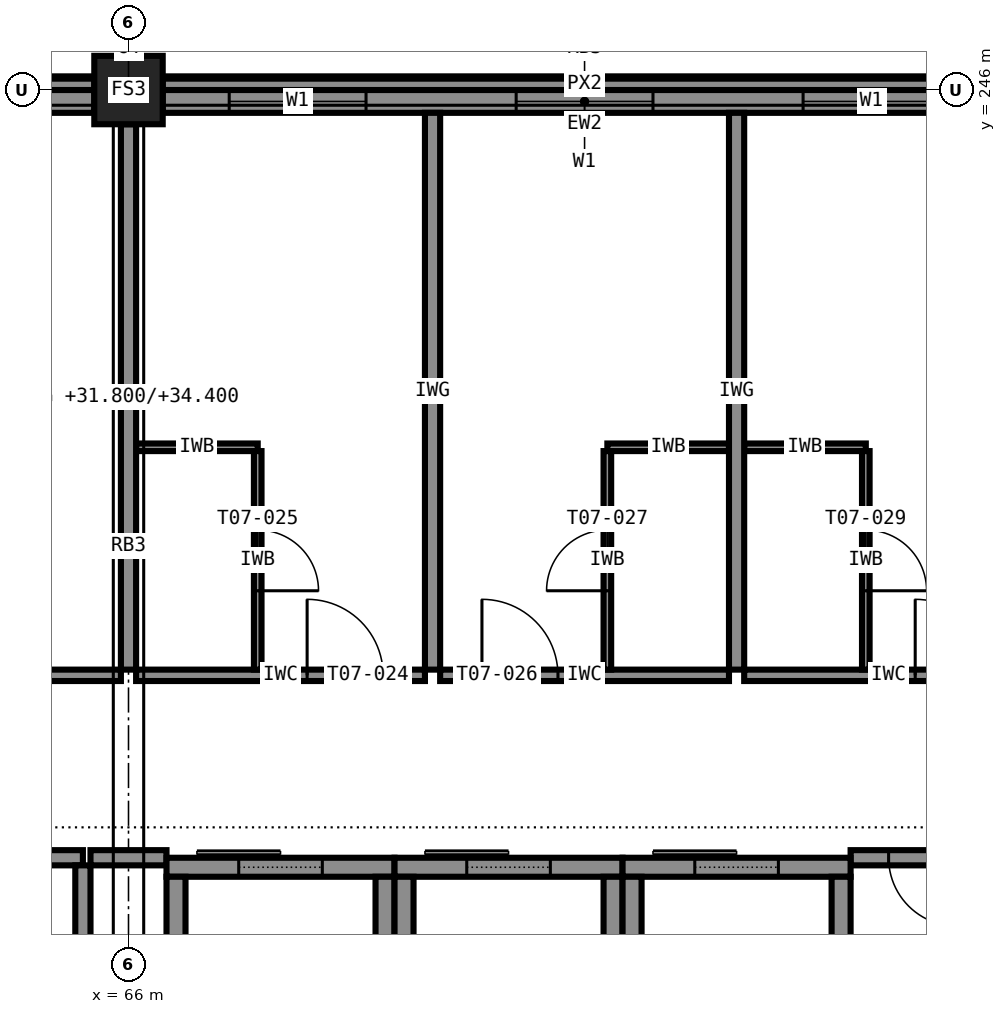
"""IFC4 building model, lengths in metres.
Left out: names, types, materials, properties, quantities, classifications, styles, units other than length and angle.
Written with IfcOpenShell. Run it as: python <this file> out.ifc"""

import sys

from ifc_helpers import new_model, si_unit, direction, frame, frame_2d, origin, origin_2d, place, context, subcontext, project, spatial, rectangle, extrude, element, fill, save


model = new_model("IFC4")
c1 = context("Model", 3, precision=1e-05, world=origin(), true_north=direction((0.0, 1.0)))
c2 = subcontext(c1, "Body", "Model", "MODEL_VIEW")
j1 = project(units=[si_unit("LENGTHUNIT", "METRE"), si_unit("PLANEANGLEUNIT", "RADIAN")], contexts=[c1])
p1 = place(None, origin())
s1 = spatial("IfcSite", under=j1, at=p1, CompositionType="ELEMENT")
p2 = place(p1, origin())
s2 = spatial("IfcBuilding", under=s1, at=p2, CompositionType="ELEMENT")
p3 = place(p2, frame((0.0, 0.0, 31.8)))
s3 = spatial("IfcBuildingStorey", under=s2, at=p3, CompositionType="ELEMENT", Elevation=31.8)
p4 = place(p3, frame((66.0, 246.0, 0.0), z_axis=(0.0, 0.0, 1.0), x_axis=(1.0, 0.0, 0.0)))
e1 = element("IfcColumn", 1, at=p4, inside=s3, PredefinedType="COLUMN", context=c2, shape_type="SweptSolid", body=[
    extrude(rectangle(XDim=0.9, YDim=0.9, at=origin_2d()), origin(), (0.0, 0.0, 1.0), 3.6),
])
p5 = place(p3, frame((66.5, 235.775, 0.0), z_axis=(0.0, 0.0, 1.0), x_axis=(1.0, 0.0, 0.0)))
e2 = element("IfcWall", 2, at=p5, inside=s3, PredefinedType="SHEAR", context=c2, shape_type="SweptSolid", body=[
    extrude(rectangle(XDim=3.0, YDim=0.25, at=frame_2d((1.5, 0.0))), origin(), (0.0, 0.0, 1.0), 3.6),
])
p6 = place(p5, frame((0.95, 0.0, 0.0)))
e3 = element("IfcOpeningElement", 3, at=p6, cuts=e2, PredefinedType="OPENING", context=c2, shape_type="SweptSolid", body=[
    extrude(rectangle(XDim=1.1, YDim=2.1, at=frame_2d((0.55, 1.05))), frame((0.0, 0.135, 0.0), z_axis=(0.0, -1.0, 0.0), x_axis=(1.0, 0.0, 0.0)), (0.0, 0.0, 1.0), 0.27),
])
for number, where, z_axis, x_axis in (
    (4, (66.625, 232.35, 0.0), (0.0, 0.0, 1.0), (0.0, 1.0, 0.0)),
    (5, (69.375, 232.35, 0.0), (0.0, 0.0, 1.0), (0.0, 1.0, 0.0)),
):
    element("IfcWall", number, at=place(p3, frame(where, z_axis=z_axis, x_axis=x_axis)), inside=s3, PredefinedType="SHEAR", context=c2, shape_type="SweptSolid", body=[
        extrude(rectangle(XDim=3.3, YDim=0.25, at=frame_2d((1.65, 0.0))), origin(), (0.0, 0.0, 1.0), 3.6),
    ])
p7 = place(p3, frame((69.5, 235.775, 0.0), z_axis=(0.0, 0.0, 1.0), x_axis=(1.0, 0.0, 0.0)))
e6 = element("IfcWall", 6, at=p7, inside=s3, PredefinedType="SHEAR", context=c2, shape_type="SweptSolid", body=[
    extrude(rectangle(XDim=3.0, YDim=0.25, at=frame_2d((1.5, 0.0))), origin(), (0.0, 0.0, 1.0), 3.6),
])
p8 = place(p7, frame((0.95, 0.0, 0.0)))
e7 = element("IfcOpeningElement", 7, at=p8, cuts=e6, PredefinedType="OPENING", context=c2, shape_type="SweptSolid", body=[
    extrude(rectangle(XDim=1.1, YDim=2.1, at=frame_2d((0.55, 1.05))), frame((0.0, 0.135, 0.0), z_axis=(0.0, -1.0, 0.0), x_axis=(1.0, 0.0, 0.0)), (0.0, 0.0, 1.0), 0.27),
])
for number, where, z_axis, x_axis in (
    (8, (69.625, 232.35, 0.0), (0.0, 0.0, 1.0), (0.0, 1.0, 0.0)),
    (9, (72.375, 232.35, 0.0), (0.0, 0.0, 1.0), (0.0, 1.0, 0.0)),
):
    element("IfcWall", number, at=place(p3, frame(where, z_axis=z_axis, x_axis=x_axis)), inside=s3, PredefinedType="SHEAR", context=c2, shape_type="SweptSolid", body=[
        extrude(rectangle(XDim=3.3, YDim=0.25, at=frame_2d((1.65, 0.0))), origin(), (0.0, 0.0, 1.0), 3.6),
    ])
p9 = place(p3, frame((72.5, 235.775, 0.0), z_axis=(0.0, 0.0, 1.0), x_axis=(1.0, 0.0, 0.0)))
e10 = element("IfcWall", 10, at=p9, inside=s3, PredefinedType="SHEAR", context=c2, shape_type="SweptSolid", body=[
    extrude(rectangle(XDim=3.0, YDim=0.25, at=frame_2d((1.5, 0.0))), origin(), (0.0, 0.0, 1.0), 3.6),
])
p10 = place(p9, frame((0.95, 0.0, 0.0)))
e11 = element("IfcOpeningElement", 11, at=p10, cuts=e10, PredefinedType="OPENING", context=c2, shape_type="SweptSolid", body=[
    extrude(rectangle(XDim=1.1, YDim=2.1, at=frame_2d((0.55, 1.05))), frame((0.0, 0.135, 0.0), z_axis=(0.0, -1.0, 0.0), x_axis=(1.0, 0.0, 0.0)), (0.0, 0.0, 1.0), 0.27),
])
for number, where, z_axis, x_axis in (
    (12, (72.625, 232.35, 0.0), (0.0, 0.0, 1.0), (0.0, 1.0, 0.0)),
    (13, (75.375, 232.35, 0.0), (0.0, 0.0, 1.0), (0.0, 1.0, 0.0)),
):
    element("IfcWall", number, at=place(p3, frame(where, z_axis=z_axis, x_axis=x_axis)), inside=s3, PredefinedType="SHEAR", context=c2, shape_type="SweptSolid", body=[
        extrude(rectangle(XDim=3.3, YDim=0.25, at=frame_2d((1.65, 0.0))), origin(), (0.0, 0.0, 1.0), 3.6),
    ])
p11 = place(p3, frame((77.55, 245.85, 0.0), z_axis=(0.0, 0.0, 1.0), x_axis=(-1.0, 0.0, 0.0)))
e14 = element("IfcWall", 14, at=p11, inside=s3, PredefinedType="STANDARD", context=c2, shape_type="SweptSolid", body=[
    extrude(rectangle(XDim=11.1, YDim=0.3, at=frame_2d((5.55, 0.0))), origin(), (0.0, 0.0, 1.0), 2.6),
])
p12 = place(p11, frame((8.425, 0.0, 0.85)))
e15 = element("IfcOpeningElement", 15, at=p12, cuts=e14, PredefinedType="OPENING", context=c2, shape_type="SweptSolid", body=[
    extrude(rectangle(XDim=1.8, YDim=1.75, at=frame_2d((0.9, 0.875))), frame((0.0, 0.16, 0.0), z_axis=(0.0, -1.0, 0.0), x_axis=(1.0, 0.0, 0.0)), (0.0, 0.0, 1.0), 0.32),
])
p13 = place(p11, frame((4.65, 0.0, 0.85)))
e16 = element("IfcOpeningElement", 16, at=p13, cuts=e14, PredefinedType="OPENING", context=c2, shape_type="SweptSolid", body=[
    extrude(rectangle(XDim=1.8, YDim=1.75, at=frame_2d((0.9, 0.875))), frame((0.0, 0.16, 0.0), z_axis=(0.0, -1.0, 0.0), x_axis=(1.0, 0.0, 0.0)), (0.0, 0.0, 1.0), 0.32),
])
p14 = place(p11, frame((0.875, 0.0, 0.85)))
e17 = element("IfcOpeningElement", 17, at=p14, cuts=e14, PredefinedType="OPENING", context=c2, shape_type="SweptSolid", body=[
    extrude(rectangle(XDim=1.8, YDim=1.75, at=frame_2d((0.9, 0.875))), frame((0.0, 0.16, 0.0), z_axis=(0.0, -1.0, 0.0), x_axis=(1.0, 0.0, 0.0)), (0.0, 0.0, 1.0), 0.32),
])
p15 = place(p3, frame((65.55, 245.85, 0.0), z_axis=(0.0, 0.0, 1.0), x_axis=(-1.0, 0.0, 0.0)))
e18 = element("IfcWall", 18, at=p15, inside=s3, PredefinedType="STANDARD", context=c2, shape_type="SweptSolid", body=[
    extrude(rectangle(XDim=11.1, YDim=0.3, at=frame_2d((5.55, 0.0))), origin(), (0.0, 0.0, 1.0), 2.6),
])
p16 = place(p15, frame((7.425, 0.0, 0.85)))
e19 = element("IfcOpeningElement", 19, at=p16, cuts=e18, PredefinedType="OPENING", context=c2, shape_type="SweptSolid", body=[
    extrude(rectangle(XDim=1.8, YDim=1.75, at=frame_2d((0.9, 0.875))), frame((0.0, 0.16, 0.0), z_axis=(0.0, -1.0, 0.0), x_axis=(1.0, 0.0, 0.0)), (0.0, 0.0, 1.0), 0.32),
])
p17 = place(p15, frame((1.875, 0.0, 0.85)))
e20 = element("IfcOpeningElement", 20, at=p17, cuts=e18, PredefinedType="OPENING", context=c2, shape_type="SweptSolid", body=[
    extrude(rectangle(XDim=1.8, YDim=1.75, at=frame_2d((0.9, 0.875))), frame((0.0, 0.16, 0.0), z_axis=(0.0, -1.0, 0.0), x_axis=(1.0, 0.0, 0.0)), (0.0, 0.0, 1.0), 0.32),
])
for number, where, z_axis, x_axis in (
    (21, (77.55, 246.075, 3.4), (0.0, 0.0, 1.0), (-1.0, 0.0, 0.0)),
    (22, (65.55, 246.075, 3.4), (0.0, 0.0, 1.0), (-1.0, 0.0, 0.0)),
):
    element("IfcWall", number, at=place(p3, frame(where, z_axis=z_axis, x_axis=x_axis)), inside=s3, PredefinedType="STANDARD", context=c2, shape_type="SweptSolid", body=[
        extrude(rectangle(XDim=11.1, YDim=0.15, at=frame_2d((5.55, 0.0))), origin(), (0.0, 0.0, 1.0), 0.2),
    ])
p18 = place(p3, frame((63.5, 235.9, 0.0), z_axis=(0.0, 0.0, 1.0), x_axis=(1.0, 0.0, 0.0)))
e23 = element("IfcWall", 23, at=p18, inside=s3, PredefinedType="PARTITIONING", context=c2, shape_type="SweptSolid", body=[
    extrude(rectangle(XDim=1.9, YDim=0.2, at=frame_2d((0.95, 0.0))), origin(), (0.0, 0.0, 1.0), 3.4),
])
p19 = place(p3, frame((65.5, 235.9, 0.0), z_axis=(0.0, 0.0, 1.0), x_axis=(1.0, 0.0, 0.0)))
e24 = element("IfcWall", 24, at=p19, inside=s3, PredefinedType="PARTITIONING", context=c2, shape_type="SweptSolid", body=[
    extrude(rectangle(XDim=1.0, YDim=0.2, at=frame_2d((0.5, 0.0))), origin(), (0.0, 0.0, 1.0), 3.4),
])
p20 = place(p3, frame((77.4, 235.9, 0.0), z_axis=(0.0, 0.0, 1.0), x_axis=(-1.0, 0.0, 0.0)))
e25 = element("IfcWall", 25, at=p20, inside=s3, PredefinedType="PARTITIONING", context=c2, shape_type="SweptSolid", body=[
    extrude(rectangle(XDim=1.9, YDim=0.2, at=frame_2d((0.95, 0.0))), origin(), (0.0, 0.0, 1.0), 3.4),
])
p21 = place(p20, frame((0.5, 0.0, 0.0)))
e26 = element("IfcOpeningElement", 26, at=p21, cuts=e25, PredefinedType="OPENING", context=c2, shape_type="SweptSolid", body=[
    extrude(rectangle(XDim=0.9, YDim=2.1, at=frame_2d((0.45, 1.05))), frame((0.0, 0.11, 0.0), z_axis=(0.0, -1.0, 0.0), x_axis=(1.0, 0.0, 0.0)), (0.0, 0.0, 1.0), 0.22),
])
p22 = place(p3, frame((65.4, 232.2, 0.0), z_axis=(0.0, 0.0, 1.0), x_axis=(0.0, 1.0, 0.0)))
e27 = element("IfcWall", 27, at=p22, inside=s3, PredefinedType="PARTITIONING", context=c2, shape_type="SweptSolid", body=[
    extrude(rectangle(XDim=3.6, YDim=0.2, at=frame_2d((1.8, 0.0))), origin(), (0.0, 0.0, 1.0), 3.4),
])
p23 = place(p3, frame((60.1, 238.3, 0.0), z_axis=(0.0, 0.0, 1.0), x_axis=(1.0, 0.0, 0.0)))
e28 = element("IfcWall", 28, at=p23, inside=s3, PredefinedType="PARTITIONING", context=c2, shape_type="SweptSolid", body=[
    extrude(rectangle(XDim=5.8, YDim=0.15, at=frame_2d((2.9, 0.0))), origin(), (0.0, 0.0, 1.0), 3.4),
])
p24 = place(p23, frame((2.4, 0.0, 0.0)))
e29 = element("IfcOpeningElement", 29, at=p24, cuts=e28, PredefinedType="OPENING", context=c2, shape_type="SweptSolid", body=[
    extrude(rectangle(XDim=1.0, YDim=2.1, at=frame_2d((0.5, 1.05))), frame((0.0, 0.085, 0.0), z_axis=(0.0, -1.0, 0.0), x_axis=(1.0, 0.0, 0.0)), (0.0, 0.0, 1.0), 0.17),
])
p25 = place(p3, frame((66.1, 238.3, 0.0), z_axis=(0.0, 0.0, 1.0), x_axis=(1.0, 0.0, 0.0)))
e30 = element("IfcWall", 30, at=p25, inside=s3, PredefinedType="PARTITIONING", context=c2, shape_type="SweptSolid", body=[
    extrude(rectangle(XDim=3.8, YDim=0.15, at=frame_2d((1.9, 0.0))), origin(), (0.0, 0.0, 1.0), 3.4),
])
p26 = place(p25, frame((2.25, 0.0, 0.0)))
e31 = element("IfcOpeningElement", 31, at=p26, cuts=e30, PredefinedType="OPENING", context=c2, shape_type="SweptSolid", body=[
    extrude(rectangle(XDim=1.0, YDim=2.1, at=frame_2d((0.5, 1.05))), frame((0.0, 0.085, 0.0), z_axis=(0.0, -1.0, 0.0), x_axis=(1.0, 0.0, 0.0)), (0.0, 0.0, 1.0), 0.17),
])
p27 = place(p3, frame((66.1, 241.3, 0.0), z_axis=(0.0, 0.0, 1.0), x_axis=(1.0, 0.0, 0.0)))
e32 = element("IfcWall", 32, at=p27, inside=s3, PredefinedType="PARTITIONING", context=c2, shape_type="SweptSolid", body=[
    extrude(rectangle(XDim=1.6, YDim=0.1, at=frame_2d((0.8, 0.0))), origin(), (0.0, 0.0, 1.0), 3.4),
])
p28 = place(p3, frame((67.7, 241.25, 0.0), z_axis=(0.0, 0.0, 1.0), x_axis=(0.0, -1.0, 0.0)))
e33 = element("IfcWall", 33, at=p28, inside=s3, PredefinedType="PARTITIONING", context=c2, shape_type="SweptSolid", body=[
    extrude(rectangle(XDim=2.875, YDim=0.1, at=frame_2d((1.438, 0.0))), origin(), (0.0, 0.0, 1.0), 3.4),
])
p29 = place(p28, frame((1.038, 0.0, 0.0)))
e34 = element("IfcOpeningElement", 34, at=p29, cuts=e33, PredefinedType="OPENING", context=c2, shape_type="SweptSolid", body=[
    extrude(rectangle(XDim=0.8, YDim=2.1, at=frame_2d((0.4, 1.05))), frame((0.0, 0.06, 0.0), z_axis=(0.0, -1.0, 0.0), x_axis=(1.0, 0.0, 0.0)), (0.0, 0.0, 1.0), 0.12),
])
p30 = place(p3, frame((70.1, 238.3, 0.0), z_axis=(0.0, 0.0, 1.0), x_axis=(1.0, 0.0, 0.0)))
e35 = element("IfcWall", 35, at=p30, inside=s3, PredefinedType="PARTITIONING", context=c2, shape_type="SweptSolid", body=[
    extrude(rectangle(XDim=3.8, YDim=0.15, at=frame_2d((1.9, 0.0))), origin(), (0.0, 0.0, 1.0), 3.4),
])
p31 = place(p30, frame((0.55, 0.0, 0.0)))
e36 = element("IfcOpeningElement", 36, at=p31, cuts=e35, PredefinedType="OPENING", context=c2, shape_type="SweptSolid", body=[
    extrude(rectangle(XDim=1.0, YDim=2.1, at=frame_2d((0.5, 1.05))), frame((0.0, 0.085, 0.0), z_axis=(0.0, -1.0, 0.0), x_axis=(1.0, 0.0, 0.0)), (0.0, 0.0, 1.0), 0.17),
])
p32 = place(p3, frame((72.3, 241.3, 0.0), z_axis=(0.0, 0.0, 1.0), x_axis=(1.0, 0.0, 0.0)))
e37 = element("IfcWall", 37, at=p32, inside=s3, PredefinedType="PARTITIONING", context=c2, shape_type="SweptSolid", body=[
    extrude(rectangle(XDim=1.6, YDim=0.1, at=frame_2d((0.8, 0.0))), origin(), (0.0, 0.0, 1.0), 3.4),
])
p33 = place(p3, frame((72.3, 238.375, 0.0), z_axis=(0.0, 0.0, 1.0), x_axis=(0.0, 1.0, 0.0)))
e38 = element("IfcWall", 38, at=p33, inside=s3, PredefinedType="PARTITIONING", context=c2, shape_type="SweptSolid", body=[
    extrude(rectangle(XDim=2.875, YDim=0.1, at=frame_2d((1.438, 0.0))), origin(), (0.0, 0.0, 1.0), 3.4),
])
p34 = place(p33, frame((1.038, 0.0, 0.0)))
e39 = element("IfcOpeningElement", 39, at=p34, cuts=e38, PredefinedType="OPENING", context=c2, shape_type="SweptSolid", body=[
    extrude(rectangle(XDim=0.8, YDim=2.1, at=frame_2d((0.4, 1.05))), frame((0.0, 0.06, 0.0), z_axis=(0.0, -1.0, 0.0), x_axis=(1.0, 0.0, 0.0)), (0.0, 0.0, 1.0), 0.12),
])
p35 = place(p3, frame((74.1, 238.3, 0.0), z_axis=(0.0, 0.0, 1.0), x_axis=(1.0, 0.0, 0.0)))
e40 = element("IfcWall", 40, at=p35, inside=s3, PredefinedType="PARTITIONING", context=c2, shape_type="SweptSolid", body=[
    extrude(rectangle(XDim=3.8, YDim=0.15, at=frame_2d((1.9, 0.0))), origin(), (0.0, 0.0, 1.0), 3.4),
])
p36 = place(p35, frame((2.25, 0.0, 0.0)))
e41 = element("IfcOpeningElement", 41, at=p36, cuts=e40, PredefinedType="OPENING", context=c2, shape_type="SweptSolid", body=[
    extrude(rectangle(XDim=1.0, YDim=2.1, at=frame_2d((0.5, 1.05))), frame((0.0, 0.085, 0.0), z_axis=(0.0, -1.0, 0.0), x_axis=(1.0, 0.0, 0.0)), (0.0, 0.0, 1.0), 0.17),
])
p37 = place(p3, frame((74.1, 241.3, 0.0), z_axis=(0.0, 0.0, 1.0), x_axis=(1.0, 0.0, 0.0)))
e42 = element("IfcWall", 42, at=p37, inside=s3, PredefinedType="PARTITIONING", context=c2, shape_type="SweptSolid", body=[
    extrude(rectangle(XDim=1.6, YDim=0.1, at=frame_2d((0.8, 0.0))), origin(), (0.0, 0.0, 1.0), 3.4),
])
p38 = place(p3, frame((75.7, 241.25, 0.0), z_axis=(0.0, 0.0, 1.0), x_axis=(0.0, -1.0, 0.0)))
e43 = element("IfcWall", 43, at=p38, inside=s3, PredefinedType="PARTITIONING", context=c2, shape_type="SweptSolid", body=[
    extrude(rectangle(XDim=2.875, YDim=0.1, at=frame_2d((1.438, 0.0))), origin(), (0.0, 0.0, 1.0), 3.4),
])
p39 = place(p38, frame((1.038, 0.0, 0.0)))
e44 = element("IfcOpeningElement", 44, at=p39, cuts=e43, PredefinedType="OPENING", context=c2, shape_type="SweptSolid", body=[
    extrude(rectangle(XDim=0.8, YDim=2.1, at=frame_2d((0.4, 1.05))), frame((0.0, 0.06, 0.0), z_axis=(0.0, -1.0, 0.0), x_axis=(1.0, 0.0, 0.0)), (0.0, 0.0, 1.0), 0.12),
])
p40 = place(p3, frame((66.0, 245.55, 0.0), z_axis=(0.0, 0.0, 1.0), x_axis=(0.0, -1.0, 0.0)))
e45 = element("IfcWall", 45, at=p40, inside=s3, PredefinedType="PARTITIONING", context=c2, shape_type="SweptSolid", body=[
    extrude(rectangle(XDim=7.175, YDim=0.2, at=frame_2d((3.587, 0.0))), origin(), (0.0, 0.0, 1.0), 2.6),
])
for number, where, z_axis, x_axis in (
    (46, (70.0, 245.7, 0.0), (0.0, 0.0, 1.0), (0.0, -1.0, 0.0)),
    (47, (74.0, 245.7, 0.0), (0.0, 0.0, 1.0), (0.0, -1.0, 0.0)),
):
    element("IfcWall", number, at=place(p3, frame(where, z_axis=z_axis, x_axis=x_axis)), inside=s3, PredefinedType="PARTITIONING", context=c2, shape_type="SweptSolid", body=[
        extrude(rectangle(XDim=7.325, YDim=0.2, at=frame_2d((3.663, 0.0))), origin(), (0.0, 0.0, 1.0), 3.4),
    ])
p41 = place(p12, origin())
e48 = element("IfcWindow", 48, at=p41, inside=s3, PartitioningType="SINGLE_PANEL", PredefinedType="WINDOW", context=c2, shape_type="SweptSolid", body=[
    extrude(rectangle(XDim=1.8, YDim=1.75, at=frame_2d((0.9, 0.875))), frame((0.0, 0.03, 0.0), z_axis=(0.0, -1.0, 0.0), x_axis=(1.0, 0.0, 0.0)), (0.0, 0.0, 1.0), 0.06),
])
fill(e15, e48)
p42 = place(p13, origin())
e49 = element("IfcWindow", 49, at=p42, inside=s3, PartitioningType="SINGLE_PANEL", PredefinedType="WINDOW", context=c2, shape_type="SweptSolid", body=[
    extrude(rectangle(XDim=1.8, YDim=1.75, at=frame_2d((0.9, 0.875))), frame((0.0, 0.03, 0.0), z_axis=(0.0, -1.0, 0.0), x_axis=(1.0, 0.0, 0.0)), (0.0, 0.0, 1.0), 0.06),
])
fill(e16, e49)
p43 = place(p14, origin())
e50 = element("IfcWindow", 50, at=p43, inside=s3, PartitioningType="SINGLE_PANEL", PredefinedType="WINDOW", context=c2, shape_type="SweptSolid", body=[
    extrude(rectangle(XDim=1.8, YDim=1.75, at=frame_2d((0.9, 0.875))), frame((0.0, 0.03, 0.0), z_axis=(0.0, -1.0, 0.0), x_axis=(1.0, 0.0, 0.0)), (0.0, 0.0, 1.0), 0.06),
])
fill(e17, e50)
p44 = place(p21, origin())
e51 = element("IfcDoor", 51, at=p44, inside=s3, OperationType="SINGLE_SWING_LEFT", PredefinedType="DOOR", context=c2, shape_type="SweptSolid", body=[
    extrude(rectangle(XDim=0.9, YDim=2.1, at=frame_2d((0.45, 1.05))), frame((0.0, 0.025, 0.0), z_axis=(0.0, -1.0, 0.0), x_axis=(1.0, 0.0, 0.0)), (0.0, 0.0, 1.0), 0.05),
])
fill(e26, e51)
p45 = place(p26, origin())
e52 = element("IfcDoor", 52, at=p45, inside=s3, OperationType="SINGLE_SWING_LEFT", PredefinedType="DOOR", context=c2, shape_type="SweptSolid", body=[
    extrude(rectangle(XDim=1.0, YDim=2.1, at=frame_2d((0.5, 1.05))), frame((0.0, 0.025, 0.0), z_axis=(0.0, -1.0, 0.0), x_axis=(1.0, 0.0, 0.0)), (0.0, 0.0, 1.0), 0.05),
])
fill(e31, e52)
p46 = place(p29, origin())
e53 = element("IfcDoor", 53, at=p46, inside=s3, OperationType="SINGLE_SWING_RIGHT", PredefinedType="DOOR", context=c2, shape_type="SweptSolid", body=[
    extrude(rectangle(XDim=0.8, YDim=2.1, at=frame_2d((0.4, 1.05))), frame((0.0, 0.025, 0.0), z_axis=(0.0, -1.0, 0.0), x_axis=(1.0, 0.0, 0.0)), (0.0, 0.0, 1.0), 0.05),
])
fill(e34, e53)
p47 = place(p31, origin())
e54 = element("IfcDoor", 54, at=p47, inside=s3, OperationType="SINGLE_SWING_LEFT", PredefinedType="DOOR", context=c2, shape_type="SweptSolid", body=[
    extrude(rectangle(XDim=1.0, YDim=2.1, at=frame_2d((0.5, 1.05))), frame((0.0, 0.025, 0.0), z_axis=(0.0, -1.0, 0.0), x_axis=(1.0, 0.0, 0.0)), (0.0, 0.0, 1.0), 0.05),
])
fill(e36, e54)
p48 = place(p34, origin())
e55 = element("IfcDoor", 55, at=p48, inside=s3, OperationType="SINGLE_SWING_LEFT", PredefinedType="DOOR", context=c2, shape_type="SweptSolid", body=[
    extrude(rectangle(XDim=0.8, YDim=2.1, at=frame_2d((0.4, 1.05))), frame((0.0, 0.025, 0.0), z_axis=(0.0, -1.0, 0.0), x_axis=(1.0, 0.0, 0.0)), (0.0, 0.0, 1.0), 0.05),
])
fill(e39, e55)
p49 = place(p36, origin())
e56 = element("IfcDoor", 56, at=p49, inside=s3, OperationType="SINGLE_SWING_LEFT", PredefinedType="DOOR", context=c2, shape_type="SweptSolid", body=[
    extrude(rectangle(XDim=1.0, YDim=2.1, at=frame_2d((0.5, 1.05))), frame((0.0, 0.025, 0.0), z_axis=(0.0, -1.0, 0.0), x_axis=(1.0, 0.0, 0.0)), (0.0, 0.0, 1.0), 0.05),
])
fill(e41, e56)
p50 = place(p39, origin())
e57 = element("IfcDoor", 57, at=p50, inside=s3, OperationType="SINGLE_SWING_RIGHT", PredefinedType="DOOR", context=c2, shape_type="SweptSolid", body=[
    extrude(rectangle(XDim=0.8, YDim=2.1, at=frame_2d((0.4, 1.05))), frame((0.0, 0.025, 0.0), z_axis=(0.0, -1.0, 0.0), x_axis=(1.0, 0.0, 0.0)), (0.0, 0.0, 1.0), 0.05),
])
fill(e44, e57)
p51 = place(p6, origin())
e58 = element("IfcDoor", 58, at=p51, inside=s3, OperationType="SLIDING_TO_LEFT", PredefinedType="DOOR", context=c2, shape_type="SweptSolid", body=[
    extrude(rectangle(XDim=1.1, YDim=2.1, at=frame_2d((0.55, 1.05))), frame((0.0, 0.025, 0.0), z_axis=(0.0, -1.0, 0.0), x_axis=(1.0, 0.0, 0.0)), (0.0, 0.0, 1.0), 0.05),
])
fill(e3, e58)
p52 = place(p8, origin())
e59 = element("IfcDoor", 59, at=p52, inside=s3, OperationType="SLIDING_TO_LEFT", PredefinedType="DOOR", context=c2, shape_type="SweptSolid", body=[
    extrude(rectangle(XDim=1.1, YDim=2.1, at=frame_2d((0.55, 1.05))), frame((0.0, 0.025, 0.0), z_axis=(0.0, -1.0, 0.0), x_axis=(1.0, 0.0, 0.0)), (0.0, 0.0, 1.0), 0.05),
])
fill(e7, e59)
p53 = place(p10, origin())
e60 = element("IfcDoor", 60, at=p53, inside=s3, OperationType="SLIDING_TO_LEFT", PredefinedType="DOOR", context=c2, shape_type="SweptSolid", body=[
    extrude(rectangle(XDim=1.1, YDim=2.1, at=frame_2d((0.55, 1.05))), frame((0.0, 0.025, 0.0), z_axis=(0.0, -1.0, 0.0), x_axis=(1.0, 0.0, 0.0)), (0.0, 0.0, 1.0), 0.05),
])
fill(e11, e60)
save(model, sys.argv[1])
